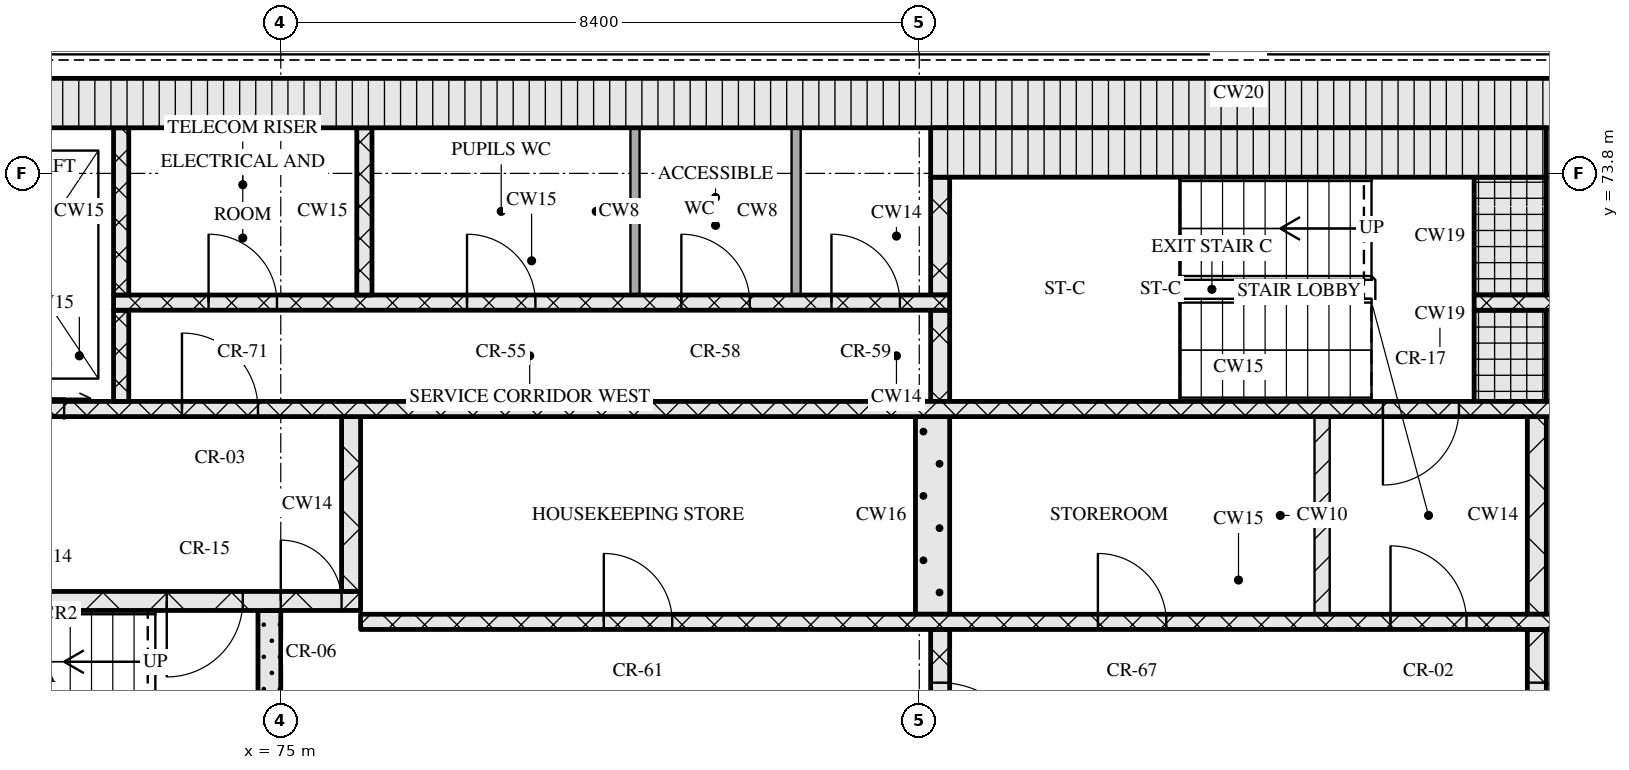
"""IFC4 building model, lengths in metres.
Left out: names, types, materials, properties, quantities, classifications, styles, units other than length and angle.
Written with IfcOpenShell. Run it as: python <this file> out.ifc"""

import sys

from ifc_helpers import new_model, si_unit, direction, frame, frame_2d, origin, place, context, subcontext, project, spatial, rectangle, extrude, element, fill, save


model = new_model("IFC4")
c1 = context("Model", 3, precision=1e-05, world=origin(), true_north=direction((0.0, 1.0)))
c2 = subcontext(c1, "Body", "Model", "MODEL_VIEW")
j1 = project(units=[si_unit("LENGTHUNIT", "METRE"), si_unit("PLANEANGLEUNIT", "RADIAN")], contexts=[c1])
p1 = place(None, origin())
s1 = spatial("IfcSite", under=j1, at=p1, CompositionType="ELEMENT")
p2 = place(p1, origin())
s2 = spatial("IfcBuilding", under=s1, at=p2, CompositionType="ELEMENT")
p3 = place(p2, frame((0.0, 0.0, 216.3)))
s3 = spatial("IfcBuildingStorey", under=s2, at=p3, CompositionType="ELEMENT", Elevation=216.3)
p4 = place(p3, frame((67.15, 74.725, 0.0), z_axis=(0.0, 0.0, 1.0), x_axis=(1.0, 0.0, 0.0)))
e1 = element("IfcWall", 1, at=p4, inside=s3, PredefinedType="SOLIDWALL", context=c2, shape_type="SweptSolid", body=[
    extrude(rectangle(XDim=40.9, YDim=0.65, at=frame_2d((20.45, 0.0))), origin(), (0.0, 0.0, 1.0), 3.32),
])
p5 = place(p3, frame((74.85, 65.2, 0.0), z_axis=(0.0, 0.0, 1.0), x_axis=(0.0, 1.0, 0.0)))
e2 = element("IfcWall", 2, at=p5, inside=s3, PredefinedType="SOLIDWALL", context=c2, shape_type="SweptSolid", body=[
    extrude(rectangle(XDim=2.85, YDim=0.3, at=frame_2d((1.425, 0.0))), origin(), (0.0, 0.0, 1.0), 3.32),
])
p6 = place(p3, frame((83.675, 65.2, 0.0), z_axis=(0.0, 0.0, 1.0), x_axis=(0.0, 1.0, 0.0)))
e3 = element("IfcWall", 3, at=p6, inside=s3, PredefinedType="SOLIDWALL", context=c2, shape_type="SweptSolid", body=[
    extrude(rectangle(XDim=2.6, YDim=0.25, at=frame_2d((1.3, 0.0))), origin(), (0.0, 0.0, 1.0), 3.32),
])
p7 = place(p6, frame((0.7, 0.0, 0.0)))
e4 = element("IfcOpeningElement", 4, at=p7, cuts=e3, PredefinedType="OPENING", context=c2, shape_type="SweptSolid", body=[
    extrude(rectangle(XDim=1.2, YDim=2.1, at=frame_2d((0.6, 1.05))), frame((0.0, 0.135, 0.0), z_axis=(0.0, -1.0, 0.0), x_axis=(1.0, 0.0, 0.0)), (0.0, 0.0, 1.0), 0.27),
])
p8 = place(p3, frame((91.525, 65.2, 0.0), z_axis=(0.0, 0.0, 1.0), x_axis=(0.0, 1.0, 0.0)))
e5 = element("IfcWall", 5, at=p8, inside=s3, PredefinedType="SOLIDWALL", context=c2, shape_type="SweptSolid", body=[
    extrude(rectangle(XDim=2.6, YDim=0.25, at=frame_2d((1.3, 0.0))), origin(), (0.0, 0.0, 1.0), 3.32),
])
p9 = place(p8, frame((0.7, 0.0, 0.0)))
e6 = element("IfcOpeningElement", 6, at=p9, cuts=e5, PredefinedType="OPENING", context=c2, shape_type="SweptSolid", body=[
    extrude(rectangle(XDim=1.2, YDim=2.1, at=frame_2d((0.6, 1.05))), frame((0.0, 0.135, 0.0), z_axis=(0.0, -1.0, 0.0), x_axis=(1.0, 0.0, 0.0)), (0.0, 0.0, 1.0), 0.27),
])
p10 = place(p3, frame((76.05, 67.9, 0.0), z_axis=(0.0, 0.0, 1.0), x_axis=(1.0, 0.0, 0.0)))
e7 = element("IfcWall", 7, at=p10, inside=s3, PredefinedType="SOLIDWALL", context=c2, shape_type="SweptSolid", body=[
    extrude(rectangle(XDim=23.1, YDim=0.2, at=frame_2d((11.55, 0.0))), origin(), (0.0, 0.0, 1.0), 3.32),
])
p11 = place(p10, frame((3.2, 0.0, 0.0)))
e8 = element("IfcOpeningElement", 8, at=p11, cuts=e7, PredefinedType="OPENING", context=c2, shape_type="SweptSolid", body=[
    extrude(rectangle(XDim=0.9, YDim=2.1, at=frame_2d((0.45, 1.05))), frame((0.0, 0.11, 0.0), z_axis=(0.0, -1.0, 0.0), x_axis=(1.0, 0.0, 0.0)), (0.0, 0.0, 1.0), 0.22),
])
p12 = place(p10, frame((9.7, 0.0, 0.0)))
e9 = element("IfcOpeningElement", 9, at=p12, cuts=e7, PredefinedType="OPENING", context=c2, shape_type="SweptSolid", body=[
    extrude(rectangle(XDim=0.9, YDim=2.1, at=frame_2d((0.45, 1.05))), frame((0.0, 0.11, 0.0), z_axis=(0.0, -1.0, 0.0), x_axis=(1.0, 0.0, 0.0)), (0.0, 0.0, 1.0), 0.22),
])
p13 = place(p10, frame((13.55, 0.0, 0.0)))
e10 = element("IfcOpeningElement", 10, at=p13, cuts=e7, PredefinedType="OPENING", context=c2, shape_type="SweptSolid", body=[
    extrude(rectangle(XDim=1.0, YDim=2.1, at=frame_2d((0.5, 1.05))), frame((0.0, 0.11, 0.0), z_axis=(0.0, -1.0, 0.0), x_axis=(1.0, 0.0, 0.0)), (0.0, 0.0, 1.0), 0.22),
])
p14 = place(p10, frame((16.2, 0.0, 0.0)))
e11 = element("IfcOpeningElement", 11, at=p14, cuts=e7, PredefinedType="OPENING", context=c2, shape_type="SweptSolid", body=[
    extrude(rectangle(XDim=1.1, YDim=2.1, at=frame_2d((0.55, 1.05))), frame((0.0, 0.11, 0.0), z_axis=(0.0, -1.0, 0.0), x_axis=(1.0, 0.0, 0.0)), (0.0, 0.0, 1.0), 0.22),
])
p15 = place(p10, frame((18.7, 0.0, 0.0)))
e12 = element("IfcOpeningElement", 12, at=p15, cuts=e7, PredefinedType="OPENING", context=c2, shape_type="SweptSolid", body=[
    extrude(rectangle(XDim=1.1, YDim=2.1, at=frame_2d((0.55, 1.05))), frame((0.0, 0.11, 0.0), z_axis=(0.0, -1.0, 0.0), x_axis=(1.0, 0.0, 0.0)), (0.0, 0.0, 1.0), 0.22),
])
p16 = place(p10, frame((21.2, 0.0, 0.0)))
e13 = element("IfcOpeningElement", 13, at=p16, cuts=e7, PredefinedType="OPENING", context=c2, shape_type="SweptSolid", body=[
    extrude(rectangle(XDim=1.1, YDim=2.1, at=frame_2d((0.55, 1.05))), frame((0.0, 0.11, 0.0), z_axis=(0.0, -1.0, 0.0), x_axis=(1.0, 0.0, 0.0)), (0.0, 0.0, 1.0), 0.22),
])
p17 = place(p3, frame((83.575, 68.0, 0.0), z_axis=(0.0, 0.0, 1.0), x_axis=(0.0, 1.0, 0.0)))
e14 = element("IfcWall", 14, at=p17, inside=s3, PredefinedType="SOLIDWALL", context=c2, shape_type="SweptSolid", body=[
    extrude(rectangle(XDim=2.6, YDim=0.45, at=frame_2d((1.3, 0.0))), origin(), (0.0, 0.0, 1.0), 3.32),
])
p18 = place(p3, frame((88.7, 68.0, 0.0), z_axis=(0.0, 0.0, 1.0), x_axis=(0.0, 1.0, 0.0)))
e15 = element("IfcWall", 15, at=p18, inside=s3, PredefinedType="PARTITIONING", context=c2, shape_type="SweptSolid", body=[
    extrude(rectangle(XDim=2.6, YDim=0.2, at=frame_2d((1.3, 0.0))), origin(), (0.0, 0.0, 1.0), 3.32),
])
p19 = place(p3, frame((91.525, 68.0, 0.0), z_axis=(0.0, 0.0, 1.0), x_axis=(0.0, 1.0, 0.0)))
e16 = element("IfcWall", 16, at=p19, inside=s3, PredefinedType="SOLIDWALL", context=c2, shape_type="SweptSolid", body=[
    extrude(rectangle(XDim=2.6, YDim=0.25, at=frame_2d((1.3, 0.0))), origin(), (0.0, 0.0, 1.0), 3.32),
])
p20 = place(p3, frame((67.8, 68.175, 0.0), z_axis=(0.0, 0.0, 1.0), x_axis=(1.0, 0.0, 0.0)))
e17 = element("IfcWall", 17, at=p20, inside=s3, PredefinedType="SOLIDWALL", context=c2, shape_type="SweptSolid", body=[
    extrude(rectangle(XDim=8.25, YDim=0.25, at=frame_2d((4.125, 0.0))), origin(), (0.0, 0.0, 1.0), 3.32),
])
p21 = place(p20, frame((5.7, 0.0, 0.0)))
e18 = element("IfcOpeningElement", 18, at=p21, cuts=e17, PredefinedType="OPENING", context=c2, shape_type="SweptSolid", body=[
    extrude(rectangle(XDim=1.0, YDim=2.1, at=frame_2d((0.5, 1.05))), frame((0.0, 0.135, 0.0), z_axis=(0.0, -1.0, 0.0), x_axis=(1.0, 0.0, 0.0)), (0.0, 0.0, 1.0), 0.27),
])
p22 = place(p20, frame((7.2, 0.0, 0.0)))
e19 = element("IfcOpeningElement", 19, at=p22, cuts=e17, PredefinedType="OPENING", context=c2, shape_type="SweptSolid", body=[
    extrude(rectangle(XDim=0.8, YDim=2.1, at=frame_2d((0.4, 1.05))), frame((0.0, 0.135, 0.0), z_axis=(0.0, -1.0, 0.0), x_axis=(1.0, 0.0, 0.0)), (0.0, 0.0, 1.0), 0.27),
])
p23 = place(p3, frame((75.925, 68.3, 0.0), z_axis=(0.0, 0.0, 1.0), x_axis=(0.0, 1.0, 0.0)))
e20 = element("IfcWall", 20, at=p23, inside=s3, PredefinedType="SOLIDWALL", context=c2, shape_type="SweptSolid", body=[
    extrude(rectangle(XDim=2.3, YDim=0.25, at=frame_2d((1.15, 0.0))), origin(), (0.0, 0.0, 1.0), 3.32),
])
p24 = place(p3, frame((67.8, 70.7, 0.0), z_axis=(0.0, 0.0, 1.0), x_axis=(1.0, 0.0, 0.0)))
e21 = element("IfcWall", 21, at=p24, inside=s3, PredefinedType="SOLIDWALL", context=c2, shape_type="SweptSolid", body=[
    extrude(rectangle(XDim=39.6, YDim=0.2, at=frame_2d((19.8, 0.0))), origin(), (0.0, 0.0, 1.0), 3.32),
])
p25 = place(p24, frame((0.65, 0.0, 0.0)))
e22 = element("IfcOpeningElement", 22, at=p25, cuts=e21, PredefinedType="OPENING", context=c2, shape_type="SweptSolid", body=[
    extrude(rectangle(XDim=1.1, YDim=2.1, at=frame_2d((0.55, 1.05))), frame((0.0, 0.11, 0.0), z_axis=(0.0, -1.0, 0.0), x_axis=(1.0, 0.0, 0.0)), (0.0, 0.0, 1.0), 0.22),
])
p26 = place(p24, frame((3.25, 0.0, 0.0)))
e23 = element("IfcOpeningElement", 23, at=p26, cuts=e21, PredefinedType="OPENING", context=c2, shape_type="SweptSolid", body=[
    extrude(rectangle(XDim=1.1, YDim=2.1, at=frame_2d((0.55, 1.05))), frame((0.0, 0.11, 0.0), z_axis=(0.0, -1.0, 0.0), x_axis=(1.0, 0.0, 0.0)), (0.0, 0.0, 1.0), 0.22),
])
p27 = place(p24, frame((5.9, 0.0, 0.0)))
e24 = element("IfcOpeningElement", 24, at=p27, cuts=e21, PredefinedType="OPENING", context=c2, shape_type="SweptSolid", body=[
    extrude(rectangle(XDim=1.0, YDim=2.1, at=frame_2d((0.5, 1.05))), frame((0.0, 0.11, 0.0), z_axis=(0.0, -1.0, 0.0), x_axis=(1.0, 0.0, 0.0)), (0.0, 0.0, 1.0), 0.22),
])
p28 = place(p24, frame((21.7, 0.0, 0.0)))
e25 = element("IfcOpeningElement", 25, at=p28, cuts=e21, PredefinedType="OPENING", context=c2, shape_type="SweptSolid", body=[
    extrude(rectangle(XDim=1.0, YDim=2.1, at=frame_2d((0.5, 1.05))), frame((0.0, 0.11, 0.0), z_axis=(0.0, -1.0, 0.0), x_axis=(1.0, 0.0, 0.0)), (0.0, 0.0, 1.0), 0.22),
])
p29 = place(p24, frame((32.7, 0.0, 0.0)))
e26 = element("IfcOpeningElement", 26, at=p29, cuts=e21, PredefinedType="OPENING", context=c2, shape_type="SweptSolid", body=[
    extrude(rectangle(XDim=1.0, YDim=2.1, at=frame_2d((0.5, 1.05))), frame((0.0, 0.11, 0.0), z_axis=(0.0, -1.0, 0.0), x_axis=(1.0, 0.0, 0.0)), (0.0, 0.0, 1.0), 0.22),
])
p30 = place(p24, frame((35.25, 0.0, 0.0)))
e27 = element("IfcOpeningElement", 27, at=p30, cuts=e21, PredefinedType="OPENING", context=c2, shape_type="SweptSolid", body=[
    extrude(rectangle(XDim=1.1, YDim=2.1, at=frame_2d((0.55, 1.05))), frame((0.0, 0.11, 0.0), z_axis=(0.0, -1.0, 0.0), x_axis=(1.0, 0.0, 0.0)), (0.0, 0.0, 1.0), 0.22),
])
p31 = place(p24, frame((37.85, 0.0, 0.0)))
e28 = element("IfcOpeningElement", 28, at=p31, cuts=e21, PredefinedType="OPENING", context=c2, shape_type="SweptSolid", body=[
    extrude(rectangle(XDim=1.1, YDim=2.1, at=frame_2d((0.55, 1.05))), frame((0.0, 0.11, 0.0), z_axis=(0.0, -1.0, 0.0), x_axis=(1.0, 0.0, 0.0)), (0.0, 0.0, 1.0), 0.22),
])
p32 = place(p3, frame((72.9, 70.8, 0.0), z_axis=(0.0, 0.0, 1.0), x_axis=(0.0, 1.0, 0.0)))
e29 = element("IfcWall", 29, at=p32, inside=s3, PredefinedType="SOLIDWALL", context=c2, shape_type="SweptSolid", body=[
    extrude(rectangle(XDim=1.2, YDim=0.2, at=frame_2d((0.6, 0.0))), origin(), (0.0, 0.0, 1.0), 3.32),
])
p33 = place(p3, frame((83.675, 70.8, 0.0), z_axis=(0.0, 0.0, 1.0), x_axis=(0.0, 1.0, 0.0)))
e30 = element("IfcWall", 30, at=p33, inside=s3, PredefinedType="SOLIDWALL", context=c2, shape_type="SweptSolid", body=[
    extrude(rectangle(XDim=1.2, YDim=0.25, at=frame_2d((0.6, 0.0))), origin(), (0.0, 0.0, 1.0), 3.32),
])
p34 = place(p3, frame((91.175, 70.8, 0.0), z_axis=(0.0, 0.0, 1.0), x_axis=(0.0, 1.0, 0.0)))
e31 = element("IfcWall", 31, at=p34, inside=s3, PredefinedType="SOLIDWALL", context=c2, shape_type="SweptSolid", body=[
    extrude(rectangle(XDim=1.2, YDim=0.95, at=frame_2d((0.6, 0.0))), origin(), (0.0, 0.0, 1.0), 3.32),
])
p35 = place(p3, frame((72.8, 72.1, 0.0), z_axis=(0.0, 0.0, 1.0), x_axis=(1.0, 0.0, 0.0)))
e32 = element("IfcWall", 32, at=p35, inside=s3, PredefinedType="SOLIDWALL", context=c2, shape_type="SweptSolid", body=[
    extrude(rectangle(XDim=11.0, YDim=0.2, at=frame_2d((5.5, 0.0))), origin(), (0.0, 0.0, 1.0), 3.32),
])
p36 = place(p35, frame((1.25, 0.0, 0.0)))
e33 = element("IfcOpeningElement", 33, at=p36, cuts=e32, PredefinedType="OPENING", context=c2, shape_type="SweptSolid", body=[
    extrude(rectangle(XDim=0.9, YDim=2.1, at=frame_2d((0.45, 1.05))), frame((0.0, 0.11, 0.0), z_axis=(0.0, -1.0, 0.0), x_axis=(1.0, 0.0, 0.0)), (0.0, 0.0, 1.0), 0.22),
])
p37 = place(p35, frame((4.65, 0.0, 0.0)))
e34 = element("IfcOpeningElement", 34, at=p37, cuts=e32, PredefinedType="OPENING", context=c2, shape_type="SweptSolid", body=[
    extrude(rectangle(XDim=0.9, YDim=2.1, at=frame_2d((0.45, 1.05))), frame((0.0, 0.11, 0.0), z_axis=(0.0, -1.0, 0.0), x_axis=(1.0, 0.0, 0.0)), (0.0, 0.0, 1.0), 0.22),
])
p38 = place(p35, frame((7.47, 0.0, 0.0)))
e35 = element("IfcOpeningElement", 35, at=p38, cuts=e32, PredefinedType="OPENING", context=c2, shape_type="SweptSolid", body=[
    extrude(rectangle(XDim=0.9, YDim=2.1, at=frame_2d((0.45, 1.05))), frame((0.0, 0.11, 0.0), z_axis=(0.0, -1.0, 0.0), x_axis=(1.0, 0.0, 0.0)), (0.0, 0.0, 1.0), 0.22),
])
p39 = place(p35, frame((9.445, 0.0, 0.0)))
e36 = element("IfcOpeningElement", 36, at=p39, cuts=e32, PredefinedType="OPENING", context=c2, shape_type="SweptSolid", body=[
    extrude(rectangle(XDim=0.9, YDim=2.1, at=frame_2d((0.45, 1.05))), frame((0.0, 0.11, 0.0), z_axis=(0.0, -1.0, 0.0), x_axis=(1.0, 0.0, 0.0)), (0.0, 0.0, 1.0), 0.22),
])
p40 = place(p3, frame((90.7, 72.1, 0.0), z_axis=(0.0, 0.0, 1.0), x_axis=(1.0, 0.0, 0.0)))
e37 = element("IfcWall", 37, at=p40, inside=s3, PredefinedType="SOLIDWALL", context=c2, shape_type="SweptSolid", body=[
    extrude(rectangle(XDim=11.7, YDim=0.2, at=frame_2d((5.85, 0.0))), origin(), (0.0, 0.0, 1.0), 3.32),
])
p41 = place(p40, frame((1.6, 0.0, 0.0)))
e38 = element("IfcOpeningElement", 38, at=p41, cuts=e37, PredefinedType="OPENING", context=c2, shape_type="SweptSolid", body=[
    extrude(rectangle(XDim=0.9, YDim=2.1, at=frame_2d((0.45, 1.05))), frame((0.0, 0.11, 0.0), z_axis=(0.0, -1.0, 0.0), x_axis=(1.0, 0.0, 0.0)), (0.0, 0.0, 1.0), 0.22),
])
p42 = place(p40, frame((5.335, 0.0, 0.0)))
e39 = element("IfcOpeningElement", 39, at=p42, cuts=e37, PredefinedType="OPENING", context=c2, shape_type="SweptSolid", body=[
    extrude(rectangle(XDim=0.9, YDim=2.1, at=frame_2d((0.45, 1.05))), frame((0.0, 0.11, 0.0), z_axis=(0.0, -1.0, 0.0), x_axis=(1.0, 0.0, 0.0)), (0.0, 0.0, 1.0), 0.22),
])
p43 = place(p40, frame((9.55, 0.0, 0.0)))
e40 = element("IfcOpeningElement", 40, at=p43, cuts=e37, PredefinedType="OPENING", context=c2, shape_type="SweptSolid", body=[
    extrude(rectangle(XDim=0.9, YDim=2.1, at=frame_2d((0.45, 1.05))), frame((0.0, 0.11, 0.0), z_axis=(0.0, -1.0, 0.0), x_axis=(1.0, 0.0, 0.0)), (0.0, 0.0, 1.0), 0.22),
])
for number, where, z_axis, x_axis in (
    (41, (72.9, 72.2, 0.0), (0.0, 0.0, 1.0), (0.0, 1.0, 0.0)),
    (42, (76.1, 72.2, 0.0), (0.0, 0.0, 1.0), (0.0, 1.0, 0.0)),
):
    element("IfcWall", number, at=place(p3, frame(where, z_axis=z_axis, x_axis=x_axis)), inside=s3, PredefinedType="SOLIDWALL", context=c2, shape_type="SweptSolid", body=[
        extrude(rectangle(XDim=2.2, YDim=0.2, at=frame_2d((1.1, 0.0))), origin(), (0.0, 0.0, 1.0), 3.32),
    ])
for number, where, z_axis, x_axis in (
    (43, (79.66, 72.2, 0.0), (0.0, 0.0, 1.0), (0.0, 1.0, 0.0)),
    (44, (81.78, 72.2, 0.0), (0.0, 0.0, 1.0), (0.0, 1.0, 0.0)),
):
    element("IfcWall", number, at=place(p3, frame(where, z_axis=z_axis, x_axis=x_axis)), inside=s3, PredefinedType="PARTITIONING", context=c2, shape_type="SweptSolid", body=[
        extrude(rectangle(XDim=2.2, YDim=0.12, at=frame_2d((1.1, 0.0))), origin(), (0.0, 0.0, 1.0), 3.32),
    ])
p44 = place(p3, frame((83.675, 72.2, 0.0), z_axis=(0.0, 0.0, 1.0), x_axis=(0.0, 1.0, 0.0)))
e45 = element("IfcWall", 45, at=p44, inside=s3, PredefinedType="SOLIDWALL", context=c2, shape_type="SweptSolid", body=[
    extrude(rectangle(XDim=1.55, YDim=0.25, at=frame_2d((0.775, 0.0))), origin(), (0.0, 0.0, 1.0), 3.32),
])
p45 = place(p3, frame((91.175, 72.2, 0.0), z_axis=(0.0, 0.0, 1.0), x_axis=(0.0, 1.0, 0.0)))
e46 = element("IfcWall", 46, at=p45, inside=s3, PredefinedType="SOLIDWALL", context=c2, shape_type="SweptSolid", body=[
    extrude(rectangle(XDim=1.55, YDim=0.95, at=frame_2d((0.775, 0.0))), origin(), (0.0, 0.0, 1.0), 3.32),
])
p46 = place(p3, frame((83.55, 74.075, 0.0), z_axis=(0.0, 0.0, 1.0), x_axis=(1.0, 0.0, 0.0)))
e47 = element("IfcWall", 47, at=p46, inside=s3, PredefinedType="SOLIDWALL", context=c2, shape_type="SweptSolid", body=[
    extrude(rectangle(XDim=8.1, YDim=0.65, at=frame_2d((4.05, 0.0))), origin(), (0.0, 0.0, 1.0), 3.32),
])
p47 = place(p7, origin())
e48 = element("IfcDoor", 48, at=p47, inside=s3, OperationType="SINGLE_SWING_RIGHT", PredefinedType="DOOR", context=c2, shape_type="SweptSolid", body=[
    extrude(rectangle(XDim=1.2, YDim=2.1, at=frame_2d((0.6, 1.05))), frame((0.0, 0.025, 0.0), z_axis=(0.0, -1.0, 0.0), x_axis=(1.0, 0.0, 0.0)), (0.0, 0.0, 1.0), 0.05),
])
fill(e4, e48)
p48 = place(p9, origin())
e49 = element("IfcDoor", 49, at=p48, inside=s3, OperationType="SINGLE_SWING_RIGHT", PredefinedType="DOOR", context=c2, shape_type="SweptSolid", body=[
    extrude(rectangle(XDim=1.2, YDim=2.1, at=frame_2d((0.6, 1.05))), frame((0.0, 0.025, 0.0), z_axis=(0.0, -1.0, 0.0), x_axis=(1.0, 0.0, 0.0)), (0.0, 0.0, 1.0), 0.05),
])
fill(e6, e49)
p49 = place(p11, origin())
e50 = element("IfcDoor", 50, at=p49, inside=s3, OperationType="SINGLE_SWING_LEFT", PredefinedType="DOOR", context=c2, shape_type="SweptSolid", body=[
    extrude(rectangle(XDim=0.9, YDim=2.1, at=frame_2d((0.45, 1.05))), frame((0.0, 0.025, 0.0), z_axis=(0.0, -1.0, 0.0), x_axis=(1.0, 0.0, 0.0)), (0.0, 0.0, 1.0), 0.05),
])
fill(e8, e50)
p50 = place(p12, origin())
e51 = element("IfcDoor", 51, at=p50, inside=s3, OperationType="SINGLE_SWING_LEFT", PredefinedType="DOOR", context=c2, shape_type="SweptSolid", body=[
    extrude(rectangle(XDim=0.9, YDim=2.1, at=frame_2d((0.45, 1.05))), frame((0.0, 0.025, 0.0), z_axis=(0.0, -1.0, 0.0), x_axis=(1.0, 0.0, 0.0)), (0.0, 0.0, 1.0), 0.05),
])
fill(e9, e51)
p51 = place(p13, origin())
e52 = element("IfcDoor", 52, at=p51, inside=s3, OperationType="SINGLE_SWING_LEFT", PredefinedType="DOOR", context=c2, shape_type="SweptSolid", body=[
    extrude(rectangle(XDim=1.0, YDim=2.1, at=frame_2d((0.5, 1.05))), frame((0.0, 0.025, 0.0), z_axis=(0.0, -1.0, 0.0), x_axis=(1.0, 0.0, 0.0)), (0.0, 0.0, 1.0), 0.05),
])
fill(e10, e52)
p52 = place(p21, origin())
e53 = element("IfcDoor", 53, at=p52, inside=s3, OperationType="SINGLE_SWING_RIGHT", PredefinedType="DOOR", context=c2, shape_type="SweptSolid", body=[
    extrude(rectangle(XDim=1.0, YDim=2.1, at=frame_2d((0.5, 1.05))), frame((0.0, 0.025, 0.0), z_axis=(0.0, -1.0, 0.0), x_axis=(1.0, 0.0, 0.0)), (0.0, 0.0, 1.0), 0.05),
])
fill(e18, e53)
p53 = place(p22, origin())
e54 = element("IfcDoor", 54, at=p53, inside=s3, OperationType="SINGLE_SWING_LEFT", PredefinedType="DOOR", context=c2, shape_type="SweptSolid", body=[
    extrude(rectangle(XDim=0.8, YDim=2.1, at=frame_2d((0.4, 1.05))), frame((0.0, 0.025, 0.0), z_axis=(0.0, -1.0, 0.0), x_axis=(1.0, 0.0, 0.0)), (0.0, 0.0, 1.0), 0.05),
])
fill(e19, e54)
p54 = place(p26, origin())
e55 = element("IfcDoor", 55, at=p54, inside=s3, OperationType="SLIDING_TO_RIGHT", PredefinedType="DOOR", context=c2, shape_type="SweptSolid", body=[
    extrude(rectangle(XDim=1.1, YDim=2.1, at=frame_2d((0.55, 1.05))), frame((0.0, 0.025, 0.0), z_axis=(0.0, -1.0, 0.0), x_axis=(1.0, 0.0, 0.0)), (0.0, 0.0, 1.0), 0.05),
])
fill(e23, e55)
p55 = place(p27, origin())
e56 = element("IfcDoor", 56, at=p55, inside=s3, OperationType="SINGLE_SWING_LEFT", PredefinedType="DOOR", context=c2, shape_type="SweptSolid", body=[
    extrude(rectangle(XDim=1.0, YDim=2.1, at=frame_2d((0.5, 1.05))), frame((0.0, 0.025, 0.0), z_axis=(0.0, -1.0, 0.0), x_axis=(1.0, 0.0, 0.0)), (0.0, 0.0, 1.0), 0.05),
])
fill(e24, e56)
p56 = place(p28, origin())
e57 = element("IfcDoor", 57, at=p56, inside=s3, OperationType="SINGLE_SWING_RIGHT", PredefinedType="DOOR", context=c2, shape_type="SweptSolid", body=[
    extrude(rectangle(XDim=1.0, YDim=2.1, at=frame_2d((0.5, 1.05))), frame((0.0, 0.025, 0.0), z_axis=(0.0, -1.0, 0.0), x_axis=(1.0, 0.0, 0.0)), (0.0, 0.0, 1.0), 0.05),
])
fill(e25, e57)
p57 = place(p36, origin())
e58 = element("IfcDoor", 58, at=p57, inside=s3, OperationType="SINGLE_SWING_LEFT", PredefinedType="DOOR", context=c2, shape_type="SweptSolid", body=[
    extrude(rectangle(XDim=0.9, YDim=2.1, at=frame_2d((0.45, 1.05))), frame((0.0, 0.025, 0.0), z_axis=(0.0, -1.0, 0.0), x_axis=(1.0, 0.0, 0.0)), (0.0, 0.0, 1.0), 0.05),
])
fill(e33, e58)
p58 = place(p37, origin())
e59 = element("IfcDoor", 59, at=p58, inside=s3, OperationType="SINGLE_SWING_LEFT", PredefinedType="DOOR", context=c2, shape_type="SweptSolid", body=[
    extrude(rectangle(XDim=0.9, YDim=2.1, at=frame_2d((0.45, 1.05))), frame((0.0, 0.025, 0.0), z_axis=(0.0, -1.0, 0.0), x_axis=(1.0, 0.0, 0.0)), (0.0, 0.0, 1.0), 0.05),
])
fill(e34, e59)
p59 = place(p38, origin())
e60 = element("IfcDoor", 60, at=p59, inside=s3, OperationType="SINGLE_SWING_LEFT", PredefinedType="DOOR", context=c2, shape_type="SweptSolid", body=[
    extrude(rectangle(XDim=0.9, YDim=2.1, at=frame_2d((0.45, 1.05))), frame((0.0, 0.025, 0.0), z_axis=(0.0, -1.0, 0.0), x_axis=(1.0, 0.0, 0.0)), (0.0, 0.0, 1.0), 0.05),
])
fill(e35, e60)
p60 = place(p39, origin())
e61 = element("IfcDoor", 61, at=p60, inside=s3, OperationType="SINGLE_SWING_LEFT", PredefinedType="DOOR", context=c2, shape_type="SweptSolid", body=[
    extrude(rectangle(XDim=0.9, YDim=2.1, at=frame_2d((0.45, 1.05))), frame((0.0, 0.025, 0.0), z_axis=(0.0, -1.0, 0.0), x_axis=(1.0, 0.0, 0.0)), (0.0, 0.0, 1.0), 0.05),
])
fill(e36, e61)
save(model, sys.argv[1])
